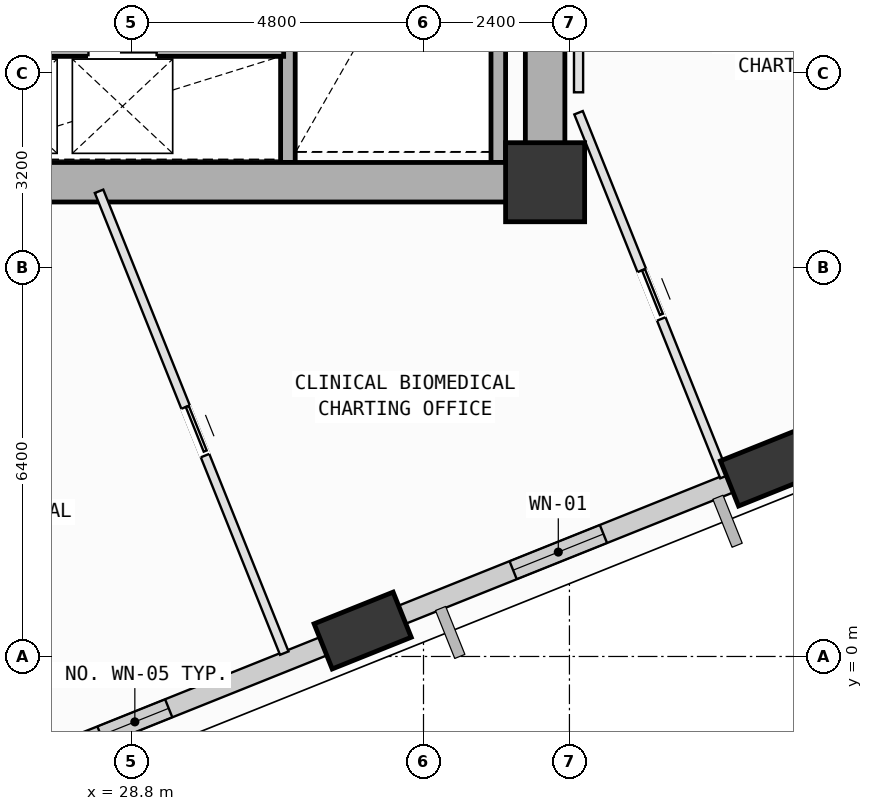
"""IFC4 building model, lengths in metres.
Left out: names, types, materials, properties, quantities, classifications, styles, units other than length and angle.
Written with IfcOpenShell. Run it as: python <this file> out.ifc"""

import sys

from ifc_helpers import new_model, si_unit, direction, frame, frame_2d, origin, origin_2d, place, context, subcontext, project, spatial, rectangle, extrude, element, fill, save


model = new_model("IFC4")
c1 = context("Model", 3, precision=1e-05, world=origin(), true_north=direction((0.0, 1.0)))
c2 = subcontext(c1, "Body", "Model", "MODEL_VIEW")
j1 = project(units=[si_unit("LENGTHUNIT", "METRE"), si_unit("PLANEANGLEUNIT", "RADIAN")], contexts=[c1])
p1 = place(None, origin())
s1 = spatial("IfcSite", under=j1, at=p1, CompositionType="ELEMENT")
p2 = place(p1, origin())
s2 = spatial("IfcBuilding", under=s1, at=p2, CompositionType="ELEMENT")
p3 = place(p2, frame((0.0, 0.0, 116.4)))
s3 = spatial("IfcBuildingStorey", under=s2, at=p3, CompositionType="ELEMENT", Elevation=116.4)
p4 = place(p3, frame((35.6, 7.8, 0.0), z_axis=(0.0, 0.0, 1.0), x_axis=(1.0, 0.0, 0.0)))
e1 = element("IfcColumn", 1, at=p4, inside=s3, PredefinedType="COLUMN", context=c2, shape_type="SweptSolid", body=[
    extrude(rectangle(XDim=1.3, YDim=1.3, at=origin_2d()), origin(), (0.0, 0.0, 1.0), 4.0),
])
p5 = place(p3, frame((32.6, 0.427, 0.002), z_axis=(0.100532198644, -0.003282187864, 0.994928391533), x_axis=(-0.339806628296, 0.939749975264, 0.037435803156)))
e2 = element("IfcColumn", 2, at=p5, inside=s3, PredefinedType="COLUMN", context=c2, shape_type="SweptSolid", body=[
    extrude(rectangle(XDim=1.4, YDim=0.8, at=origin_2d()), origin(), (0.0, 0.0, 1.0), 4.017),
])
p6 = place(p3, frame((39.282, 3.106, 0.002), z_axis=(0.089357523849, 0.024149038099, 0.995706812717), x_axis=(-0.599896462323, 0.799335620141, 0.034449976294)))
e3 = element("IfcColumn", 3, at=p6, inside=s3, PredefinedType="COLUMN", context=c2, shape_type="SweptSolid", body=[
    extrude(rectangle(XDim=1.4, YDim=0.8, at=origin_2d()), origin(), (0.0, 0.0, 1.0), 4.014),
])
p7 = place(p3, frame((32.317, 0.313, 0.0), z_axis=(0.0, 0.0, 1.0), x_axis=(-0.928171186304, -0.372153528688, 0.0)))
e4 = element("IfcWall", 4, at=p7, inside=s3, PredefinedType="SOLIDWALL", context=c2, shape_type="SweptSolid", body=[
    extrude(rectangle(XDim=6.234, YDim=0.32, at=frame_2d((3.117, 0.0))), origin(), (0.0, 0.0, 1.0), 3.165),
])
p8 = place(p7, frame((3.132, 0.0, 0.75)))
e5 = element("IfcOpeningElement", 5, at=p8, cuts=e4, PredefinedType="OPENING", context=c2, shape_type="SweptSolid", body=[
    extrude(rectangle(XDim=1.2, YDim=1.75, at=frame_2d((0.6, 0.875))), frame((0.0, 0.17, 0.0), z_axis=(0.0, -1.0, 0.0), x_axis=(1.0, 0.0, 0.0)), (0.0, 0.0, 1.0), 0.34),
])
p9 = place(p3, frame((38.993, 2.99, 0.0), z_axis=(0.0, 0.0, 1.0), x_axis=(-0.928164774406, -0.372169519913, 0.0)))
e6 = element("IfcWall", 6, at=p9, inside=s3, PredefinedType="SOLIDWALL", context=c2, shape_type="SweptSolid", body=[
    extrude(rectangle(XDim=6.214, YDim=0.32, at=frame_2d((3.107, 0.0))), origin(), (0.0, 0.0, 1.0), 3.165),
])
p10 = place(p9, frame((2.622, 0.0, 0.75)))
e7 = element("IfcOpeningElement", 7, at=p10, cuts=e6, PredefinedType="OPENING", context=c2, shape_type="SweptSolid", body=[
    extrude(rectangle(XDim=1.6, YDim=1.95, at=frame_2d((0.8, 0.975))), frame((0.0, 0.17, 0.0), z_axis=(0.0, -1.0, 0.0), x_axis=(1.0, 0.0, 0.0)), (0.0, 0.0, 1.0), 0.34),
])
for number, where, z_axis, x_axis in (
    (8, (34.83, 15.12, 0.0), (0.0, 0.0, 1.0), (0.0, -1.0, 0.0)),
    (9, (31.37, 8.125, 0.0), (0.0, 0.0, 1.0), (0.0, 1.0, 0.0)),
):
    element("IfcWall", number, at=place(p3, frame(where, z_axis=z_axis, x_axis=x_axis)), inside=s3, PredefinedType="SOLIDWALL", context=c2, shape_type="SweptSolid", body=[
        extrude(rectangle(XDim=6.995, YDim=0.24, at=frame_2d((3.498, 0.0))), origin(), (0.0, 0.0, 1.0), 3.78),
    ])
p11 = place(p3, frame((24.8, 7.8, 0.0), z_axis=(0.0, 0.0, 1.0), x_axis=(1.0, 0.0, 0.0)))
e10 = element("IfcWall", 10, at=p11, inside=s3, PredefinedType="SHEAR", context=c2, shape_type="SweptSolid", body=[
    extrude(rectangle(XDim=10.8, YDim=0.65, at=frame_2d((5.4, 0.0))), origin(), (0.0, 0.0, 1.0), 3.78),
])
p12 = place(p3, frame((35.6, 7.8, 0.0), z_axis=(0.0, 0.0, 1.0), x_axis=(0.0, 1.0, 0.0)))
e11 = element("IfcWall", 11, at=p12, inside=s3, PredefinedType="SHEAR", context=c2, shape_type="SweptSolid", body=[
    extrude(rectangle(XDim=9.0, YDim=0.65, at=frame_2d((4.5, 0.0))), origin(), (0.0, 0.0, 1.0), 3.78),
])
p13 = place(p3, frame((25.85, 10.02, 0.0), z_axis=(0.0, 0.0, 1.0), x_axis=(1.0, 0.0, 0.0)))
e12 = element("IfcWall", 12, at=p13, inside=s3, PredefinedType="SOLIDWALL", context=c2, shape_type="SweptSolid", body=[
    extrude(rectangle(XDim=5.45, YDim=0.3, at=frame_2d((2.725, 0.0))), origin(), (0.0, 0.0, 1.0), 3.78),
])
p14 = place(p13, frame((0.34, 0.0, 0.0)))
e13 = element("IfcOpeningElement", 13, at=p14, cuts=e12, PredefinedType="OPENING", context=c2, shape_type="SweptSolid", body=[
    extrude(rectangle(XDim=1.12, YDim=2.15, at=frame_2d((0.56, 1.075))), frame((0.0, 0.16, 0.0), z_axis=(0.0, -1.0, 0.0), x_axis=(1.0, 0.0, 0.0)), (0.0, 0.0, 1.0), 0.32),
])
p15 = place(p13, frame((2.24, 0.0, 0.0)))
e14 = element("IfcOpeningElement", 14, at=p15, cuts=e12, PredefinedType="OPENING", context=c2, shape_type="SweptSolid", body=[
    extrude(rectangle(XDim=1.12, YDim=2.15, at=frame_2d((0.56, 1.075))), frame((0.0, 0.16, 0.0), z_axis=(0.0, -1.0, 0.0), x_axis=(1.0, 0.0, 0.0)), (0.0, 0.0, 1.0), 0.32),
])
p16 = place(p3, frame((28.264, 7.651, 0.0), z_axis=(0.0, 0.0, 1.0), x_axis=(0.372208328406, -0.928149212285, 0.0)))
e15 = element("IfcWall", 15, at=p16, inside=s3, PredefinedType="PARTITIONING", context=c2, shape_type="SweptSolid", body=[
    extrude(rectangle(XDim=8.184, YDim=0.15, at=frame_2d((4.092, 0.0))), origin(), (0.0, 0.0, 1.0), 3.78),
])
p17 = place(p16, frame((3.824, 0.0, 0.0)))
e16 = element("IfcOpeningElement", 16, at=p17, cuts=e15, PredefinedType="OPENING", context=c2, shape_type="SweptSolid", body=[
    extrude(rectangle(XDim=0.86, YDim=2.06, at=frame_2d((0.43, 1.03))), frame((0.0, 0.085, 0.0), z_axis=(0.0, -1.0, 0.0), x_axis=(1.0, 0.0, 0.0)), (0.0, 0.0, 1.0), 0.17),
])
p18 = place(p3, frame((36.15, 8.943, 0.0), z_axis=(0.0, 0.0, 1.0), x_axis=(0.372206491807, -0.9281499488, 0.0)))
e17 = element("IfcWall", 17, at=p18, inside=s3, PredefinedType="PARTITIONING", context=c2, shape_type="SweptSolid", body=[
    extrude(rectangle(XDim=6.448, YDim=0.15, at=frame_2d((3.224, 0.0))), origin(), (0.0, 0.0, 1.0), 3.78),
])
p19 = place(p18, frame((2.794, 0.0, 0.0)))
e18 = element("IfcOpeningElement", 18, at=p19, cuts=e17, PredefinedType="OPENING", context=c2, shape_type="SweptSolid", body=[
    extrude(rectangle(XDim=0.86, YDim=2.06, at=frame_2d((0.43, 1.03))), frame((0.0, 0.085, 0.0), z_axis=(0.0, -1.0, 0.0), x_axis=(1.0, 0.0, 0.0)), (0.0, 0.0, 1.0), 0.17),
])
p20 = place(p3, frame((33.311, 0.464, 0.0), z_axis=(0.0, 0.0, 1.0), x_axis=(-0.928321842669, -0.371777563099, 0.0)))
e19 = element("IfcWall", 19, at=p20, inside=s3, PredefinedType="PARTITIONING", context=c2, shape_type="SweptSolid", body=[
    extrude(rectangle(XDim=0.979, YDim=0.15, at=frame_2d((0.49, 0.0))), origin(), (0.0, 0.0, 1.0), 3.165),
])
p21 = place(p3, frame((35.6, 7.5, 0.0), z_axis=(0.0, 0.0, 1.0), x_axis=(1.0, 0.0, 0.0)))
e20 = element("IfcWall", 20, at=p21, inside=s3, PredefinedType="PARTITIONING", context=c2, shape_type="SweptSolid", body=[
    extrude(rectangle(XDim=0.55, YDim=0.15, at=frame_2d((0.275, 0.0))), origin(), (0.0, 0.0, 1.0), 2.965),
])
p22 = place(p3, frame((36.15, 7.5, 0.0), z_axis=(0.0, 0.0, 1.0), x_axis=(0.0, 1.0, 0.0)))
e21 = element("IfcWall", 21, at=p22, inside=s3, PredefinedType="PARTITIONING", context=c2, shape_type="SweptSolid", body=[
    extrude(rectangle(XDim=0.744, YDim=0.15, at=frame_2d((0.372, 0.0))), origin(), (0.0, 0.0, 1.0), 3.78),
])
p23 = place(p3, frame((39.999, 3.146, 0.0), z_axis=(0.0, 0.0, 1.0), x_axis=(-0.928153569213, -0.372197463663, 0.0)))
e22 = element("IfcWall", 22, at=p23, inside=s3, PredefinedType="PARTITIONING", context=c2, shape_type="SweptSolid", body=[
    extrude(rectangle(XDim=0.991, YDim=0.15, at=frame_2d((0.496, 0.0))), origin(), (0.0, 0.0, 1.0), 3.165),
])
p24 = place(p3, frame((36.15, 9.279, 0.0), z_axis=(0.0, 0.0, 1.0), x_axis=(0.0, 1.0, 0.0)))
e23 = element("IfcWall", 23, at=p24, inside=s3, PredefinedType="PARTITIONING", context=c2, shape_type="SweptSolid", body=[
    extrude(rectangle(XDim=7.061, YDim=0.15, at=frame_2d((3.531, 0.0))), origin(), (0.0, 0.0, 1.0), 3.78),
])
p25 = place(p8, origin())
e24 = element("IfcWindow", 24, at=p25, inside=s3, PartitioningType="SINGLE_PANEL", PredefinedType="WINDOW", context=c2, shape_type="SweptSolid", body=[
    extrude(rectangle(XDim=1.2, YDim=1.75, at=frame_2d((0.6, 0.875))), frame((0.0, 0.03, 0.0), z_axis=(0.0, -1.0, 0.0), x_axis=(1.0, 0.0, 0.0)), (0.0, 0.0, 1.0), 0.06),
])
fill(e5, e24)
p26 = place(p10, origin())
e25 = element("IfcWindow", 25, at=p26, inside=s3, PartitioningType="SINGLE_PANEL", PredefinedType="WINDOW", context=c2, shape_type="SweptSolid", body=[
    extrude(rectangle(XDim=1.6, YDim=1.95, at=frame_2d((0.8, 0.975))), frame((0.0, 0.03, 0.0), z_axis=(0.0, -1.0, 0.0), x_axis=(1.0, 0.0, 0.0)), (0.0, 0.0, 1.0), 0.06),
])
fill(e7, e25)
p27 = place(p19, origin())
e26 = element("IfcDoor", 26, at=p27, inside=s3, OperationType="SLIDING_TO_LEFT", PredefinedType="DOOR", context=c2, shape_type="SweptSolid", body=[
    extrude(rectangle(XDim=0.86, YDim=2.06, at=frame_2d((0.43, 1.03))), frame((0.0, 0.025, 0.0), z_axis=(0.0, -1.0, 0.0), x_axis=(1.0, 0.0, 0.0)), (0.0, 0.0, 1.0), 0.05),
])
fill(e18, e26)
p28 = place(p17, origin())
e27 = element("IfcDoor", 27, at=p28, inside=s3, OperationType="SLIDING_TO_LEFT", PredefinedType="DOOR", context=c2, shape_type="SweptSolid", body=[
    extrude(rectangle(XDim=0.86, YDim=2.06, at=frame_2d((0.43, 1.03))), frame((0.0, 0.025, 0.0), z_axis=(0.0, -1.0, 0.0), x_axis=(1.0, 0.0, 0.0)), (0.0, 0.0, 1.0), 0.05),
])
fill(e16, e27)
save(model, sys.argv[1])
